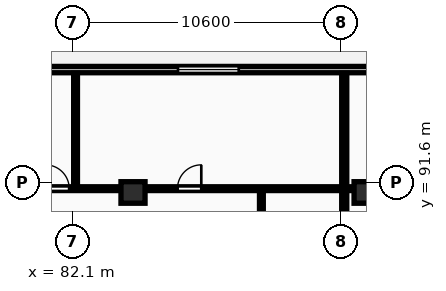
"""IFC4 building model, lengths in metres.
Left out: names, types, materials, properties, quantities, classifications, styles, units other than length and angle.
Written with IfcOpenShell. Run it as: python <this file> out.ifc"""

import sys

from ifc_helpers import new_model, si_unit, direction, frame, frame_2d, origin, origin_2d, place, context, subcontext, project, spatial, rectangle, extrude, element, fill, save


model = new_model("IFC4")
c1 = context("Model", 3, precision=1e-05, world=origin(), true_north=direction((0.0, 1.0)))
c2 = subcontext(c1, "Body", "Model", "MODEL_VIEW")
j1 = project(units=[si_unit("LENGTHUNIT", "METRE"), si_unit("PLANEANGLEUNIT", "RADIAN")], contexts=[c1])
p1 = place(None, origin())
s1 = spatial("IfcSite", under=j1, at=p1, CompositionType="ELEMENT")
p2 = place(p1, origin())
s2 = spatial("IfcBuilding", under=s1, at=p2, CompositionType="ELEMENT")
p3 = place(p2, frame((0.0, 0.0, 126.3)))
s3 = spatial("IfcBuildingStorey", under=s2, at=p3, CompositionType="ELEMENT", Elevation=126.3)
for number, where, z_axis, x_axis in (
    (1, (84.5, 91.2, 0.0), (0.0, 0.0, 1.0), (1.0, 0.0, 0.0)),
    (2, (93.7, 91.2, 0.0), (0.0, 0.0, 1.0), (1.0, 0.0, 0.0)),
):
    element("IfcColumn", number, at=place(p3, frame(where, z_axis=z_axis, x_axis=x_axis)), inside=s3, PredefinedType="COLUMN", context=c2, shape_type="SweptSolid", body=[
        extrude(rectangle(XDim=0.95, YDim=0.85, at=origin_2d()), origin(), (0.0, 0.0, 1.0), 3.25),
    ])
p4 = place(p3, frame((130.6, 96.05, 0.0), z_axis=(0.0, 0.0, 1.0), x_axis=(-1.0, 0.0, 0.0)))
e3 = element("IfcWall", 3, at=p4, inside=s3, PredefinedType="STANDARD", context=c2, shape_type="SweptSolid", body=[
    extrude(rectangle(XDim=73.0, YDim=0.25, at=frame_2d((36.5, 0.0))), origin(), (0.0, 0.0, 1.0), 2.97),
])
p5 = place(p4, frame((68.591, 0.0, 0.0)))
e4 = element("IfcOpeningElement", 4, at=p5, cuts=e3, PredefinedType="OPENING", context=c2, shape_type="SweptSolid", body=[
    extrude(rectangle(XDim=1.8, YDim=2.2, at=frame_2d((0.9, 1.1))), frame((0.0, 0.135, 0.0), z_axis=(0.0, -1.0, 0.0), x_axis=(1.0, 0.0, 0.0)), (0.0, 0.0, 1.0), 0.27),
])
p6 = place(p4, frame((60.092, 0.0, 0.85)))
e5 = element("IfcOpeningElement", 5, at=p6, cuts=e3, PredefinedType="OPENING", context=c2, shape_type="SweptSolid", body=[
    extrude(rectangle(XDim=2.4, YDim=1.9, at=frame_2d((1.2, 0.95))), frame((0.0, 0.135, 0.0), z_axis=(0.0, -1.0, 0.0), x_axis=(1.0, 0.0, 0.0)), (0.0, 0.0, 1.0), 0.27),
])
p7 = place(p4, frame((51.405, 0.0, 0.0)))
e6 = element("IfcOpeningElement", 6, at=p7, cuts=e3, PredefinedType="OPENING", context=c2, shape_type="SweptSolid", body=[
    extrude(rectangle(XDim=1.8, YDim=2.2, at=frame_2d((0.9, 1.1))), frame((0.0, 0.135, 0.0), z_axis=(0.0, -1.0, 0.0), x_axis=(1.0, 0.0, 0.0)), (0.0, 0.0, 1.0), 0.27),
])
p8 = place(p4, frame((41.925, 0.0, 0.85)))
e7 = element("IfcOpeningElement", 7, at=p8, cuts=e3, PredefinedType="OPENING", context=c2, shape_type="SweptSolid", body=[
    extrude(rectangle(XDim=2.4, YDim=1.9, at=frame_2d((1.2, 0.95))), frame((0.0, 0.135, 0.0), z_axis=(0.0, -1.0, 0.0), x_axis=(1.0, 0.0, 0.0)), (0.0, 0.0, 1.0), 0.27),
])
p9 = place(p4, frame((29.091, 0.0, 0.85)))
e8 = element("IfcOpeningElement", 8, at=p9, cuts=e3, PredefinedType="OPENING", context=c2, shape_type="SweptSolid", body=[
    extrude(rectangle(XDim=2.4, YDim=1.9, at=frame_2d((1.2, 0.95))), frame((0.0, 0.135, 0.0), z_axis=(0.0, -1.0, 0.0), x_axis=(1.0, 0.0, 0.0)), (0.0, 0.0, 1.0), 0.27),
])
p10 = place(p4, frame((23.727, 0.0, 0.85)))
e9 = element("IfcOpeningElement", 9, at=p10, cuts=e3, PredefinedType="OPENING", context=c2, shape_type="SweptSolid", body=[
    extrude(rectangle(XDim=2.4, YDim=1.9, at=frame_2d((1.2, 0.95))), frame((0.0, 0.135, 0.0), z_axis=(0.0, -1.0, 0.0), x_axis=(1.0, 0.0, 0.0)), (0.0, 0.0, 1.0), 0.27),
])
p11 = place(p4, frame((34.407, 0.0, 0.0)))
e10 = element("IfcOpeningElement", 10, at=p11, cuts=e3, PredefinedType="OPENING", context=c2, shape_type="SweptSolid", body=[
    extrude(rectangle(XDim=1.8, YDim=2.2, at=frame_2d((0.9, 1.1))), frame((0.0, 0.135, 0.0), z_axis=(0.0, -1.0, 0.0), x_axis=(1.0, 0.0, 0.0)), (0.0, 0.0, 1.0), 0.27),
])
p12 = place(p4, frame((18.72, 0.0, 0.85)))
e11 = element("IfcOpeningElement", 11, at=p12, cuts=e3, PredefinedType="OPENING", context=c2, shape_type="SweptSolid", body=[
    extrude(rectangle(XDim=2.4, YDim=1.9, at=frame_2d((1.2, 0.95))), frame((0.0, 0.135, 0.0), z_axis=(0.0, -1.0, 0.0), x_axis=(1.0, 0.0, 0.0)), (0.0, 0.0, 1.0), 0.27),
])
p13 = place(p4, frame((9.169, 0.0, 0.85)))
e12 = element("IfcOpeningElement", 12, at=p13, cuts=e3, PredefinedType="OPENING", context=c2, shape_type="SweptSolid", body=[
    extrude(rectangle(XDim=2.4, YDim=1.9, at=frame_2d((1.2, 0.95))), frame((0.0, 0.135, 0.0), z_axis=(0.0, -1.0, 0.0), x_axis=(1.0, 0.0, 0.0)), (0.0, 0.0, 1.0), 0.27),
])
p14 = place(p4, frame((5.506, 0.0, 0.85)))
e13 = element("IfcOpeningElement", 13, at=p14, cuts=e3, PredefinedType="OPENING", context=c2, shape_type="SweptSolid", body=[
    extrude(rectangle(XDim=1.8, YDim=1.8, at=frame_2d((0.9, 0.9))), frame((0.0, 0.135, 0.0), z_axis=(0.0, -1.0, 0.0), x_axis=(1.0, 0.0, 0.0)), (0.0, 0.0, 1.0), 0.27),
])
p15 = place(p4, frame((14.015, 0.0, 0.0)))
e14 = element("IfcOpeningElement", 14, at=p15, cuts=e3, PredefinedType="OPENING", context=c2, shape_type="SweptSolid", body=[
    extrude(rectangle(XDim=1.8, YDim=2.2, at=frame_2d((0.9, 1.1))), frame((0.0, 0.135, 0.0), z_axis=(0.0, -1.0, 0.0), x_axis=(1.0, 0.0, 0.0)), (0.0, 0.0, 1.0), 0.27),
])
p16 = place(p4, frame((1.135, 0.0, 0.85)))
e15 = element("IfcOpeningElement", 15, at=p16, cuts=e3, PredefinedType="OPENING", context=c2, shape_type="SweptSolid", body=[
    extrude(rectangle(XDim=2.4, YDim=1.9, at=frame_2d((1.2, 0.95))), frame((0.0, 0.135, 0.0), z_axis=(0.0, -1.0, 0.0), x_axis=(1.0, 0.0, 0.0)), (0.0, 0.0, 1.0), 0.27),
])
p17 = place(p3, frame((92.837, 69.83, 0.0), z_axis=(0.0, 0.0, 1.0), x_axis=(0.0, 1.0, 0.0)))
e16 = element("IfcWall", 16, at=p17, inside=s3, PredefinedType="PARTITIONING", context=c2, shape_type="SweptSolid", body=[
    extrude(rectangle(XDim=26.07, YDim=0.2, at=frame_2d((13.035, 0.0))), origin(), (0.0, 0.0, 1.0), 2.97),
])
p18 = place(p3, frame((89.567, 69.81, 0.0), z_axis=(0.0, 0.0, 1.0), x_axis=(0.0, 1.0, 0.0)))
e17 = element("IfcWall", 17, at=p18, inside=s3, PredefinedType="PARTITIONING", context=c2, shape_type="SweptSolid", body=[
    extrude(rectangle(XDim=21.48, YDim=0.15, at=frame_2d((10.74, 0.0))), origin(), (0.0, 0.0, 1.0), 2.97),
])
p19 = place(p18, frame((2.406, 0.0, 0.0)))
e18 = element("IfcOpeningElement", 18, at=p19, cuts=e17, PredefinedType="OPENING", context=c2, shape_type="SweptSolid", body=[
    extrude(rectangle(XDim=0.96, YDim=2.1, at=frame_2d((0.48, 1.05))), frame((0.0, 0.085, 0.0), z_axis=(0.0, -1.0, 0.0), x_axis=(1.0, 0.0, 0.0)), (0.0, 0.0, 1.0), 0.17),
])
p20 = place(p18, frame((6.133, 0.0, 0.0)))
e19 = element("IfcOpeningElement", 19, at=p20, cuts=e17, PredefinedType="OPENING", context=c2, shape_type="SweptSolid", body=[
    extrude(rectangle(XDim=0.88, YDim=2.06, at=frame_2d((0.44, 1.03))), frame((0.0, 0.085, 0.0), z_axis=(0.0, -1.0, 0.0), x_axis=(1.0, 0.0, 0.0)), (0.0, 0.0, 1.0), 0.17),
])
p21 = place(p18, frame((10.32, 0.0, 0.0)))
e20 = element("IfcOpeningElement", 20, at=p21, cuts=e17, PredefinedType="OPENING", context=c2, shape_type="SweptSolid", body=[
    extrude(rectangle(XDim=0.84, YDim=2.04, at=frame_2d((0.42, 1.02))), frame((0.0, 0.085, 0.0), z_axis=(0.0, -1.0, 0.0), x_axis=(1.0, 0.0, 0.0)), (0.0, 0.0, 1.0), 0.17),
])
p22 = place(p3, frame((82.232, 91.43, 0.0), z_axis=(0.0, 0.0, 1.0), x_axis=(0.0, 1.0, 0.0)))
e21 = element("IfcWall", 21, at=p22, inside=s3, PredefinedType="PARTITIONING", context=c2, shape_type="SweptSolid", body=[
    extrude(rectangle(XDim=4.47, YDim=0.15, at=frame_2d((2.235, 0.0))), origin(), (0.0, 0.0, 1.0), 2.97),
])
p23 = place(p3, frame((74.317, 91.35, 0.0), z_axis=(0.0, 0.0, 1.0), x_axis=(1.0, 0.0, 0.0)))
e22 = element("IfcWall", 22, at=p23, inside=s3, PredefinedType="PARTITIONING", context=c2, shape_type="SweptSolid", body=[
    extrude(rectangle(XDim=18.44, YDim=0.15, at=frame_2d((9.22, 0.0))), origin(), (0.0, 0.0, 1.0), 2.663),
])
p24 = place(p23, frame((6.725, 0.0, 0.0)))
e23 = element("IfcOpeningElement", 23, at=p24, cuts=e22, PredefinedType="OPENING", context=c2, shape_type="SweptSolid", body=[
    extrude(rectangle(XDim=0.94, YDim=2.1, at=frame_2d((0.47, 1.05))), frame((0.0, 0.085, 0.0), z_axis=(0.0, -1.0, 0.0), x_axis=(1.0, 0.0, 0.0)), (0.0, 0.0, 1.0), 0.17),
])
p25 = place(p23, frame((11.938, 0.0, 0.0)))
e24 = element("IfcOpeningElement", 24, at=p25, cuts=e22, PredefinedType="OPENING", context=c2, shape_type="SweptSolid", body=[
    extrude(rectangle(XDim=0.94, YDim=2.1, at=frame_2d((0.47, 1.05))), frame((0.0, 0.085, 0.0), z_axis=(0.0, -1.0, 0.0), x_axis=(1.0, 0.0, 0.0)), (0.0, 0.0, 1.0), 0.17),
])
p26 = place(p3, frame((92.917, 91.35, 0.0), z_axis=(0.0, 0.0, 1.0), x_axis=(1.0, 0.0, 0.0)))
e25 = element("IfcWall", 25, at=p26, inside=s3, PredefinedType="PARTITIONING", context=c2, shape_type="SweptSolid", body=[
    extrude(rectangle(XDim=15.438, YDim=0.15, at=frame_2d((7.719, 0.0))), origin(), (0.0, 0.0, 1.0), 2.663),
])
p27 = place(p26, frame((3.52, 0.0, 0.0)))
e26 = element("IfcOpeningElement", 26, at=p27, cuts=e25, PredefinedType="OPENING", context=c2, shape_type="SweptSolid", body=[
    extrude(rectangle(XDim=0.94, YDim=2.1, at=frame_2d((0.47, 1.05))), frame((0.0, 0.085, 0.0), z_axis=(0.0, -1.0, 0.0), x_axis=(1.0, 0.0, 0.0)), (0.0, 0.0, 1.0), 0.17),
])
p28 = place(p26, frame((7.279, 0.0, 0.0)))
e27 = element("IfcOpeningElement", 27, at=p28, cuts=e25, PredefinedType="OPENING", context=c2, shape_type="SweptSolid", body=[
    extrude(rectangle(XDim=0.88, YDim=2.06, at=frame_2d((0.44, 1.03))), frame((0.0, 0.085, 0.0), z_axis=(0.0, -1.0, 0.0), x_axis=(1.0, 0.0, 0.0)), (0.0, 0.0, 1.0), 0.17),
])
p29 = place(p26, frame((11.669, 0.0, 0.0)))
e28 = element("IfcOpeningElement", 28, at=p29, cuts=e25, PredefinedType="OPENING", context=c2, shape_type="SweptSolid", body=[
    extrude(rectangle(XDim=0.88, YDim=2.06, at=frame_2d((0.44, 1.03))), frame((0.0, 0.085, 0.0), z_axis=(0.0, -1.0, 0.0), x_axis=(1.0, 0.0, 0.0)), (0.0, 0.0, 1.0), 0.17),
])
p30 = place(p8, origin())
e29 = element("IfcWindow", 29, at=p30, inside=s3, PartitioningType="DOUBLE_PANEL_VERTICAL", PredefinedType="WINDOW", context=c2, shape_type="SweptSolid", body=[
    extrude(rectangle(XDim=2.4, YDim=1.9, at=frame_2d((1.2, 0.95))), frame((0.0, 0.03, 0.0), z_axis=(0.0, -1.0, 0.0), x_axis=(1.0, 0.0, 0.0)), (0.0, 0.0, 1.0), 0.06),
])
fill(e7, e29)
p31 = place(p24, origin())
e30 = element("IfcDoor", 30, at=p31, inside=s3, OperationType="SINGLE_SWING_LEFT", PredefinedType="DOOR", context=c2, shape_type="SweptSolid", body=[
    extrude(rectangle(XDim=0.94, YDim=2.1, at=frame_2d((0.47, 1.05))), frame((0.0, 0.025, 0.0), z_axis=(0.0, -1.0, 0.0), x_axis=(1.0, 0.0, 0.0)), (0.0, 0.0, 1.0), 0.05),
])
fill(e23, e30)
p32 = place(p25, origin())
e31 = element("IfcDoor", 31, at=p32, inside=s3, OperationType="SINGLE_SWING_RIGHT", PredefinedType="DOOR", context=c2, shape_type="SweptSolid", body=[
    extrude(rectangle(XDim=0.94, YDim=2.1, at=frame_2d((0.47, 1.05))), frame((0.0, 0.025, 0.0), z_axis=(0.0, -1.0, 0.0), x_axis=(1.0, 0.0, 0.0)), (0.0, 0.0, 1.0), 0.05),
])
fill(e24, e31)
save(model, sys.argv[1])
